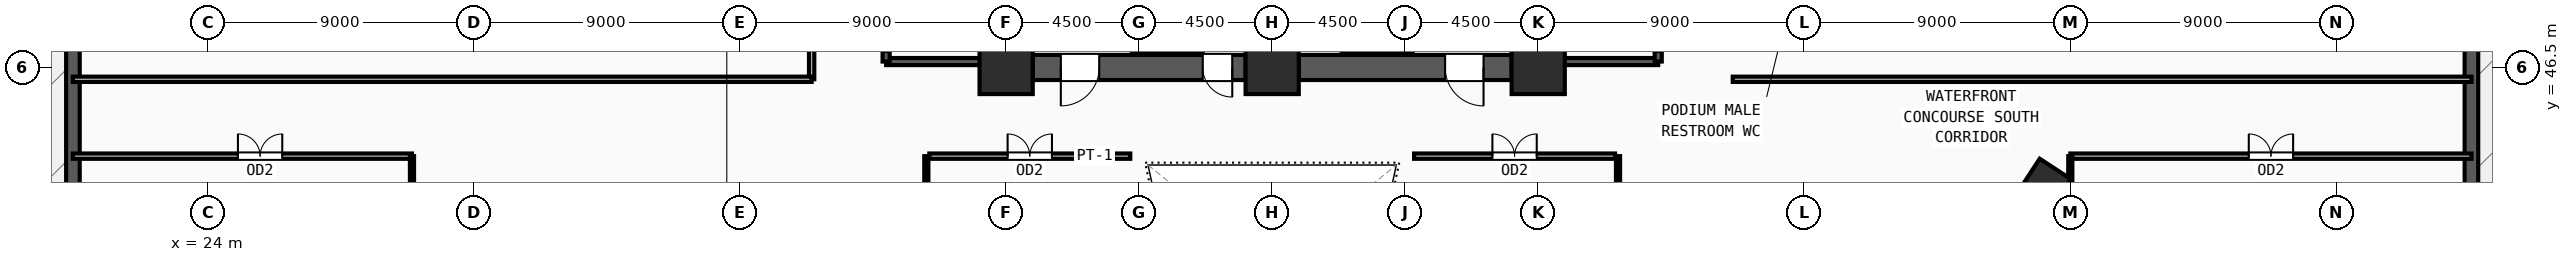
"""IFC4 building model, lengths in metres.
Left out: names, types, materials, properties, quantities, classifications, styles, units other than length and angle.
Written with IfcOpenShell. Run it as: python <this file> out.ifc"""

import sys

from ifc_helpers import new_model, si_unit, direction, frame, frame_2d, origin, origin_2d, place, context, subcontext, project, spatial, rectangle, extrude, source, transform, mapped, element, fill, save


model = new_model("IFC4")
c1 = context("Model", 3, precision=1e-05, world=origin(), true_north=direction((0.0, 1.0)))
c2 = subcontext(c1, "Body", "Model", "MODEL_VIEW")
j1 = project(units=[si_unit("LENGTHUNIT", "METRE"), si_unit("PLANEANGLEUNIT", "RADIAN")], contexts=[c1])
p1 = place(None, origin())
s1 = spatial("IfcSite", under=j1, at=p1, CompositionType="ELEMENT")
p2 = place(p1, origin())
s2 = spatial("IfcBuilding", under=s1, at=p2, CompositionType="ELEMENT")
p3 = place(p2, frame((0.0, 0.0, 9.9)))
s3 = spatial("IfcBuildingStorey", under=s2, at=p3, CompositionType="ELEMENT", Elevation=9.9)
m1 = source(origin(), c2, "Body", "SweptSolid", [
    extrude(rectangle(XDim=1.8, YDim=1.8, at=origin_2d()), origin(), (0.0, 0.0, 1.0), 4.5),
])
for number, where, z_axis, x_axis in (
    (1, (51.0, 46.5, 0.0), (0.0, 0.0, 1.0), (1.0, 0.0, 0.0)),
    (2, (60.0, 46.5, 0.0), (0.0, 0.0, 1.0), (1.0, 0.0, 0.0)),
    (3, (69.0, 46.5, 0.0), (0.0, 0.0, 1.0), (1.0, 0.0, 0.0)),
):
    element("IfcColumn", number, at=place(p3, frame(where, z_axis=z_axis, x_axis=x_axis)), inside=s3, PredefinedType="COLUMN", context=c2, shape_type="MappedRepresentation", body=[
        mapped(m1, transform((0.0, 0.0, 0.0), x_axis=(1.0, 0.0, 0.0), y_axis=(0.0, 1.0, 0.0), z_axis=(0.0, 0.0, 1.0), scale=1.0)),
    ])
m2 = source(origin(), c2, "Body", "SweptSolid", [
    extrude(rectangle(XDim=1.55, YDim=1.25, at=origin_2d()), origin(), (0.0, 0.0, 1.0), 4.5),
])
p4 = place(p3, frame((86.064, 42.423, 0.0), z_axis=(0.0, 0.0, 1.0), x_axis=(0.546978918409, 0.837146380758, 0.0)))
e4 = element("IfcColumn", 4, at=p4, inside=s3, PredefinedType="COLUMN", context=c2, shape_type="MappedRepresentation", body=[
    mapped(m2, transform((0.0, 0.0, 0.0), x_axis=(1.0, 0.0, 0.0), y_axis=(0.0, 1.0, 0.0), z_axis=(0.0, 0.0, 1.0), scale=1.0)),
])
p5 = place(p3, frame((100.57, 20.54, 0.0), z_axis=(0.0, 0.0, 1.0), x_axis=(0.0, 1.0, 0.0)))
e5 = element("IfcWall", 5, at=p5, inside=s3, PredefinedType="SOLIDWALL", context=c2, shape_type="SweptSolid", body=[
    extrude(rectangle(XDim=66.23, YDim=0.46, at=frame_2d((33.115, 0.0))), origin(), (0.0, 0.0, 1.0), 4.25),
])
m3 = source(origin(), c2, "Body", "SweptSolid", [
    extrude(rectangle(XDim=2.7, YDim=2.35, at=frame_2d((1.35, 1.175))), frame((0.0, 0.24, 0.0), z_axis=(0.0, -1.0, 0.0), x_axis=(1.0, 0.0, 0.0)), (0.0, 0.0, 1.0), 0.48),
])
p6 = place(p5, frame((8.111, 0.0, 0.55)))
e6 = element("IfcOpeningElement", 6, at=p6, cuts=e5, PredefinedType="OPENING", context=c2, shape_type="MappedRepresentation", body=[
    mapped(m3, transform((0.0, 0.0, 0.0), x_axis=(1.0, 0.0, 0.0), y_axis=(0.0, 1.0, 0.0), z_axis=(0.0, 0.0, 1.0), scale=1.0)),
])
p7 = place(p5, frame((17.573, 0.0, 0.55)))
e7 = element("IfcOpeningElement", 7, at=p7, cuts=e5, PredefinedType="OPENING", context=c2, shape_type="MappedRepresentation", body=[
    mapped(m3, transform((0.0, 0.0, 0.0), x_axis=(1.0, 0.0, 0.0), y_axis=(0.0, 1.0, 0.0), z_axis=(0.0, 0.0, 1.0), scale=1.0)),
])
p8 = place(p5, frame((27.034, 0.0, 0.55)))
e8 = element("IfcOpeningElement", 8, at=p8, cuts=e5, PredefinedType="OPENING", context=c2, shape_type="MappedRepresentation", body=[
    mapped(m3, transform((0.0, 0.0, 0.0), x_axis=(1.0, 0.0, 0.0), y_axis=(0.0, 1.0, 0.0), z_axis=(0.0, 0.0, 1.0), scale=1.0)),
])
p9 = place(p5, frame((36.496, 0.0, 0.55)))
e9 = element("IfcOpeningElement", 9, at=p9, cuts=e5, PredefinedType="OPENING", context=c2, shape_type="MappedRepresentation", body=[
    mapped(m3, transform((0.0, 0.0, 0.0), x_axis=(1.0, 0.0, 0.0), y_axis=(0.0, 1.0, 0.0), z_axis=(0.0, 0.0, 1.0), scale=1.0)),
])
p10 = place(p5, frame((55.419, 0.0, 0.55)))
e10 = element("IfcOpeningElement", 10, at=p10, cuts=e5, PredefinedType="OPENING", context=c2, shape_type="MappedRepresentation", body=[
    mapped(m3, transform((0.0, 0.0, 0.0), x_axis=(1.0, 0.0, 0.0), y_axis=(0.0, 1.0, 0.0), z_axis=(0.0, 0.0, 1.0), scale=1.0)),
])
p11 = place(p3, frame((19.43, 86.77, 0.0), z_axis=(0.0, 0.0, 1.0), x_axis=(0.0, -1.0, 0.0)))
e11 = element("IfcWall", 11, at=p11, inside=s3, PredefinedType="SOLIDWALL", context=c2, shape_type="SweptSolid", body=[
    extrude(rectangle(XDim=66.23, YDim=0.46, at=frame_2d((33.115, 0.0))), origin(), (0.0, 0.0, 1.0), 4.25),
])
p12 = place(p11, frame((8.111, 0.0, 0.55)))
e12 = element("IfcOpeningElement", 12, at=p12, cuts=e11, PredefinedType="OPENING", context=c2, shape_type="MappedRepresentation", body=[
    mapped(m3, transform((0.0, 0.0, 0.0), x_axis=(1.0, 0.0, 0.0), y_axis=(0.0, 1.0, 0.0), z_axis=(0.0, 0.0, 1.0), scale=1.0)),
])
p13 = place(p11, frame((27.034, 0.0, 0.55)))
e13 = element("IfcOpeningElement", 13, at=p13, cuts=e11, PredefinedType="OPENING", context=c2, shape_type="MappedRepresentation", body=[
    mapped(m3, transform((0.0, 0.0, 0.0), x_axis=(1.0, 0.0, 0.0), y_axis=(0.0, 1.0, 0.0), z_axis=(0.0, 0.0, 1.0), scale=1.0)),
])
p14 = place(p11, frame((36.496, 0.0, 0.55)))
e14 = element("IfcOpeningElement", 14, at=p14, cuts=e11, PredefinedType="OPENING", context=c2, shape_type="MappedRepresentation", body=[
    mapped(m3, transform((0.0, 0.0, 0.0), x_axis=(1.0, 0.0, 0.0), y_axis=(0.0, 1.0, 0.0), z_axis=(0.0, 0.0, 1.0), scale=1.0)),
])
p15 = place(p11, frame((45.957, 0.0, 0.55)))
e15 = element("IfcOpeningElement", 15, at=p15, cuts=e11, PredefinedType="OPENING", context=c2, shape_type="MappedRepresentation", body=[
    mapped(m3, transform((0.0, 0.0, 0.0), x_axis=(1.0, 0.0, 0.0), y_axis=(0.0, 1.0, 0.0), z_axis=(0.0, 0.0, 1.0), scale=1.0)),
])
p16 = place(p11, frame((55.419, 0.0, 0.55)))
e16 = element("IfcOpeningElement", 16, at=p16, cuts=e11, PredefinedType="OPENING", context=c2, shape_type="MappedRepresentation", body=[
    mapped(m3, transform((0.0, 0.0, 0.0), x_axis=(1.0, 0.0, 0.0), y_axis=(0.0, 1.0, 0.0), z_axis=(0.0, 0.0, 1.0), scale=1.0)),
])
p17 = place(p3, frame((68.1, 46.5, 0.0), z_axis=(0.0, 0.0, 1.0), x_axis=(-1.0, 0.0, 0.0)))
e17 = element("IfcWall", 17, at=p17, inside=s3, PredefinedType="SHEAR", context=c2, shape_type="SweptSolid", body=[
    extrude(rectangle(XDim=7.2, YDim=0.85, at=frame_2d((3.6, 0.0))), origin(), (0.0, 0.0, 1.0), 4.25),
])
m4 = source(origin(), c2, "Body", "SweptSolid", [
    extrude(rectangle(XDim=1.3, YDim=2.2, at=frame_2d((0.65, 1.1))), frame((0.0, 0.435, 0.0), z_axis=(0.0, -1.0, 0.0), x_axis=(1.0, 0.0, 0.0)), (0.0, 0.0, 1.0), 0.87),
])
p18 = place(p17, frame((0.95, 0.0, 0.0)))
e18 = element("IfcOpeningElement", 18, at=p18, cuts=e17, PredefinedType="OPENING", context=c2, shape_type="MappedRepresentation", body=[
    mapped(m4, transform((0.0, 0.0, 0.0), x_axis=(1.0, 0.0, 0.0), y_axis=(0.0, 1.0, 0.0), z_axis=(0.0, 0.0, 1.0), scale=1.0)),
])
p19 = place(p3, frame((59.1, 46.5, 0.0), z_axis=(0.0, 0.0, 1.0), x_axis=(-1.0, 0.0, 0.0)))
e19 = element("IfcWall", 19, at=p19, inside=s3, PredefinedType="SHEAR", context=c2, shape_type="SweptSolid", body=[
    extrude(rectangle(XDim=7.2, YDim=0.85, at=frame_2d((3.6, 0.0))), origin(), (0.0, 0.0, 1.0), 4.25),
])
p20 = place(p19, frame((4.95, 0.0, 0.0)))
e20 = element("IfcOpeningElement", 20, at=p20, cuts=e19, PredefinedType="OPENING", context=c2, shape_type="MappedRepresentation", body=[
    mapped(m4, transform((0.0, 0.0, 0.0), x_axis=(1.0, 0.0, 0.0), y_axis=(0.0, 1.0, 0.0), z_axis=(0.0, 0.0, 1.0), scale=1.0)),
])
m5 = source(origin(), c2, "Body", "SweptSolid", [
    extrude(rectangle(XDim=1.0, YDim=2.2, at=frame_2d((0.5, 1.1))), frame((0.0, 0.435, 0.0), z_axis=(0.0, -1.0, 0.0), x_axis=(1.0, 0.0, 0.0)), (0.0, 0.0, 1.0), 0.87),
])
p21 = place(p19, frame((0.45, 0.0, 0.0)))
e21 = element("IfcOpeningElement", 21, at=p21, cuts=e19, PredefinedType="OPENING", context=c2, shape_type="MappedRepresentation", body=[
    mapped(m5, transform((0.0, 0.0, 0.0), x_axis=(1.0, 0.0, 0.0), y_axis=(0.0, 1.0, 0.0), z_axis=(0.0, 0.0, 1.0), scale=1.0)),
])
p22 = place(p3, frame((46.94, 46.7, 0.0), z_axis=(0.0, 0.0, 1.0), x_axis=(1.0, 0.0, 0.0)))
e22 = element("IfcWall", 22, at=p22, inside=s3, PredefinedType="SOLIDWALL", context=c2, shape_type="SweptSolid", body=[
    extrude(rectangle(XDim=3.44, YDim=0.24, at=frame_2d((1.72, 0.0))), origin(), (0.0, 0.0, 1.0), 4.25),
])
p23 = place(p3, frame((50.38, 46.7, 0.0), z_axis=(0.0, 0.0, 1.0), x_axis=(0.0, 1.0, 0.0)))
e23 = element("IfcWall", 23, at=p23, inside=s3, PredefinedType="SOLIDWALL", context=c2, shape_type="SweptSolid", body=[
    extrude(rectangle(XDim=7.82, YDim=0.24, at=frame_2d((3.91, 0.0))), origin(), (0.0, 0.0, 1.0), 4.25),
])
p24 = place(p3, frame((46.94, 54.52, 0.0), z_axis=(0.0, 0.0, 1.0), x_axis=(0.0, -1.0, 0.0)))
e24 = element("IfcWall", 24, at=p24, inside=s3, PredefinedType="SOLIDWALL", context=c2, shape_type="SweptSolid", body=[
    extrude(rectangle(XDim=7.82, YDim=0.24, at=frame_2d((3.91, 0.0))), origin(), (0.0, 0.0, 1.0), 4.25),
])
m6 = source(origin(), c2, "Body", "SweptSolid", [
    extrude(rectangle(XDim=1.2, YDim=2.2, at=frame_2d((0.6, 1.1))), frame((0.0, 0.13, 0.0), z_axis=(0.0, -1.0, 0.0), x_axis=(1.0, 0.0, 0.0)), (0.0, 0.0, 1.0), 0.26),
])
p25 = place(p24, frame((6.3, 0.0, 0.0)))
e25 = element("IfcOpeningElement", 25, at=p25, cuts=e24, PredefinedType="OPENING", context=c2, shape_type="MappedRepresentation", body=[
    mapped(m6, transform((0.0, 0.0, 0.0), x_axis=(1.0, 0.0, 0.0), y_axis=(0.0, 1.0, 0.0), z_axis=(0.0, 0.0, 1.0), scale=1.0)),
])
p26 = place(p3, frame((69.62, 46.7, 0.0), z_axis=(0.0, 0.0, 1.0), x_axis=(1.0, 0.0, 0.0)))
e26 = element("IfcWall", 26, at=p26, inside=s3, PredefinedType="SOLIDWALL", context=c2, shape_type="SweptSolid", body=[
    extrude(rectangle(XDim=3.44, YDim=0.24, at=frame_2d((1.72, 0.0))), origin(), (0.0, 0.0, 1.0), 4.25),
])
p27 = place(p3, frame((73.06, 46.7, 0.0), z_axis=(0.0, 0.0, 1.0), x_axis=(0.0, 1.0, 0.0)))
e27 = element("IfcWall", 27, at=p27, inside=s3, PredefinedType="SOLIDWALL", context=c2, shape_type="SweptSolid", body=[
    extrude(rectangle(XDim=7.82, YDim=0.24, at=frame_2d((3.91, 0.0))), origin(), (0.0, 0.0, 1.0), 4.25),
])
p28 = place(p27, frame((0.32, 0.0, 0.0)))
e28 = element("IfcOpeningElement", 28, at=p28, cuts=e27, PredefinedType="OPENING", context=c2, shape_type="MappedRepresentation", body=[
    mapped(m6, transform((0.0, 0.0, 0.0), x_axis=(1.0, 0.0, 0.0), y_axis=(0.0, 1.0, 0.0), z_axis=(0.0, 0.0, 1.0), scale=1.0)),
])
p29 = place(p3, frame((69.62, 54.52, 0.0), z_axis=(0.0, 0.0, 1.0), x_axis=(0.0, -1.0, 0.0)))
e29 = element("IfcWall", 29, at=p29, inside=s3, PredefinedType="SOLIDWALL", context=c2, shape_type="SweptSolid", body=[
    extrude(rectangle(XDim=7.82, YDim=0.24, at=frame_2d((3.91, 0.0))), origin(), (0.0, 0.0, 1.0), 4.25),
])
p30 = place(p3, frame((48.4, 43.5, 0.0), z_axis=(0.0, 0.0, 1.0), x_axis=(1.0, 0.0, 0.0)))
e30 = element("IfcWall", 30, at=p30, inside=s3, PredefinedType="PARTITIONING", context=c2, shape_type="SweptSolid", body=[
    extrude(rectangle(XDim=6.8, YDim=0.18, at=frame_2d((3.4, 0.0))), origin(), (0.0, 0.0, 1.0), 4.25),
])
m7 = source(origin(), c2, "Body", "SweptSolid", [
    extrude(rectangle(XDim=1.5, YDim=2.2, at=frame_2d((0.75, 1.1))), frame((0.0, 0.1, 0.0), z_axis=(0.0, -1.0, 0.0), x_axis=(1.0, 0.0, 0.0)), (0.0, 0.0, 1.0), 0.2),
])
p31 = place(p30, frame((2.65, 0.0, 0.0)))
e31 = element("IfcOpeningElement", 31, at=p31, cuts=e30, PredefinedType="OPENING", context=c2, shape_type="MappedRepresentation", body=[
    mapped(m7, transform((0.0, 0.0, 0.0), x_axis=(1.0, 0.0, 0.0), y_axis=(0.0, 1.0, 0.0), z_axis=(0.0, 0.0, 1.0), scale=1.0)),
])
p32 = place(p3, frame((64.8, 43.5, 0.0), z_axis=(0.0, 0.0, 1.0), x_axis=(1.0, 0.0, 0.0)))
e32 = element("IfcWall", 32, at=p32, inside=s3, PredefinedType="PARTITIONING", context=c2, shape_type="SweptSolid", body=[
    extrude(rectangle(XDim=6.8, YDim=0.18, at=frame_2d((3.4, 0.0))), origin(), (0.0, 0.0, 1.0), 4.25),
])
p33 = place(p32, frame((2.65, 0.0, 0.0)))
e33 = element("IfcOpeningElement", 33, at=p33, cuts=e32, PredefinedType="OPENING", context=c2, shape_type="MappedRepresentation", body=[
    mapped(m7, transform((0.0, 0.0, 0.0), x_axis=(1.0, 0.0, 0.0), y_axis=(0.0, 1.0, 0.0), z_axis=(0.0, 0.0, 1.0), scale=1.0)),
])
p34 = place(p3, frame((19.425, 43.5, 0.0), z_axis=(0.0, 0.0, 1.0), x_axis=(1.0, 0.0, 0.0)))
e34 = element("IfcWall", 34, at=p34, inside=s3, PredefinedType="PARTITIONING", context=c2, shape_type="SweptSolid", body=[
    extrude(rectangle(XDim=11.475, YDim=0.18, at=frame_2d((5.737, 0.0))), origin(), (0.0, 0.0, 1.0), 4.25),
])
p35 = place(p34, frame((5.587, 0.0, 0.0)))
e35 = element("IfcOpeningElement", 35, at=p35, cuts=e34, PredefinedType="OPENING", context=c2, shape_type="MappedRepresentation", body=[
    mapped(m7, transform((0.0, 0.0, 0.0), x_axis=(1.0, 0.0, 0.0), y_axis=(0.0, 1.0, 0.0), z_axis=(0.0, 0.0, 1.0), scale=1.0)),
])
p36 = place(p3, frame((87.0, 43.5, 0.0), z_axis=(0.0, 0.0, 1.0), x_axis=(1.0, 0.0, 0.0)))
e36 = element("IfcWall", 36, at=p36, inside=s3, PredefinedType="PARTITIONING", context=c2, shape_type="SweptSolid", body=[
    extrude(rectangle(XDim=13.575, YDim=0.18, at=frame_2d((6.788, 0.0))), origin(), (0.0, 0.0, 1.0), 4.25),
])
p37 = place(p36, frame((6.038, 0.0, 0.0)))
e37 = element("IfcOpeningElement", 37, at=p37, cuts=e36, PredefinedType="OPENING", context=c2, shape_type="MappedRepresentation", body=[
    mapped(m7, transform((0.0, 0.0, 0.0), x_axis=(1.0, 0.0, 0.0), y_axis=(0.0, 1.0, 0.0), z_axis=(0.0, 0.0, 1.0), scale=1.0)),
])
p38 = place(p3, frame((44.42, 46.1, 0.0), z_axis=(0.0, 0.0, 1.0), x_axis=(0.0, 1.0, 0.0)))
e38 = element("IfcWall", 38, at=p38, inside=s3, PredefinedType="PARTITIONING", context=c2, shape_type="SweptSolid", body=[
    extrude(rectangle(XDim=22.0, YDim=0.18, at=frame_2d((11.0, 0.0))), origin(), (0.0, 0.0, 1.0), 4.25),
])
p39 = place(p38, frame((10.25, 0.0, 0.0)))
e39 = element("IfcOpeningElement", 39, at=p39, cuts=e38, PredefinedType="OPENING", context=c2, shape_type="MappedRepresentation", body=[
    mapped(m7, transform((0.0, 0.0, 0.0), x_axis=(1.0, 0.0, 0.0), y_axis=(0.0, 1.0, 0.0), z_axis=(0.0, 0.0, 1.0), scale=1.0)),
])
for number, where, z_axis, x_axis in (
    (40, (19.425, 46.1, 0.0), (0.0, 0.0, 1.0), (1.0, 0.0, 0.0)),
    (41, (75.58, 46.1, 0.0), (0.0, 0.0, 1.0), (1.0, 0.0, 0.0)),
):
    element("IfcWall", number, at=place(p3, frame(where, z_axis=z_axis, x_axis=x_axis)), inside=s3, PredefinedType="PARTITIONING", context=c2, shape_type="SweptSolid", body=[
        extrude(rectangle(XDim=24.995, YDim=0.18, at=frame_2d((12.498, 0.0))), origin(), (0.0, 0.0, 1.0), 4.25),
    ])
for number, where, z_axis, x_axis in (
    (42, (30.9, 19.425, 0.0), (0.0, 0.0, 1.0), (0.0, 1.0, 0.0)),
    (43, (87.0, 19.425, 0.0), (0.0, 0.0, 1.0), (0.0, 1.0, 0.0)),
    (44, (48.3, 19.425, 0.0), (0.0, 0.0, 1.0), (0.0, 1.0, 0.0)),
    (45, (71.7, 19.425, 0.0), (0.0, 0.0, 1.0), (0.0, 1.0, 0.0)),
):
    element("IfcWall", number, at=place(p3, frame(where, z_axis=z_axis, x_axis=x_axis)), inside=s3, PredefinedType="PARTITIONING", context=c2, shape_type="SweptSolid", body=[
        extrude(rectangle(XDim=24.075, YDim=0.14, at=frame_2d((12.038, 0.0))), origin(), (0.0, 0.0, 1.0), 4.25),
    ])
m8 = source(origin(), c2, "Body", "SweptSolid", [
    extrude(rectangle(XDim=1.3, YDim=2.2, at=frame_2d((0.65, 1.1))), frame((0.0, 0.025, 0.0), z_axis=(0.0, -1.0, 0.0), x_axis=(1.0, 0.0, 0.0)), (0.0, 0.0, 1.0), 0.05),
])
p40 = place(p20, origin())
e46 = element("IfcDoor", 46, at=p40, inside=s3, OperationType="SINGLE_SWING_RIGHT", PredefinedType="DOOR", context=c2, shape_type="MappedRepresentation", body=[
    mapped(m8, transform((0.0, 0.0, 0.0), x_axis=(1.0, 0.0, 0.0), y_axis=(0.0, 1.0, 0.0), z_axis=(0.0, 0.0, 1.0), scale=1.0)),
])
fill(e20, e46)
m9 = source(origin(), c2, "Body", "SweptSolid", [
    extrude(rectangle(XDim=1.0, YDim=2.2, at=frame_2d((0.5, 1.1))), frame((0.0, 0.025, 0.0), z_axis=(0.0, -1.0, 0.0), x_axis=(1.0, 0.0, 0.0)), (0.0, 0.0, 1.0), 0.05),
])
p41 = place(p21, origin())
e47 = element("IfcDoor", 47, at=p41, inside=s3, OperationType="SINGLE_SWING_LEFT", PredefinedType="DOOR", context=c2, shape_type="MappedRepresentation", body=[
    mapped(m9, transform((0.0, 0.0, 0.0), x_axis=(1.0, 0.0, 0.0), y_axis=(0.0, 1.0, 0.0), z_axis=(0.0, 0.0, 1.0), scale=1.0)),
])
fill(e21, e47)
p42 = place(p18, origin())
e48 = element("IfcDoor", 48, at=p42, inside=s3, OperationType="SINGLE_SWING_LEFT", PredefinedType="DOOR", context=c2, shape_type="MappedRepresentation", body=[
    mapped(m8, transform((0.0, 0.0, 0.0), x_axis=(1.0, 0.0, 0.0), y_axis=(0.0, 1.0, 0.0), z_axis=(0.0, 0.0, 1.0), scale=1.0)),
])
fill(e18, e48)
m10 = source(origin(), c2, "Body", "SweptSolid", [
    extrude(rectangle(XDim=1.5, YDim=2.2, at=frame_2d((0.75, 1.1))), frame((0.0, 0.025, 0.0), z_axis=(0.0, -1.0, 0.0), x_axis=(1.0, 0.0, 0.0)), (0.0, 0.0, 1.0), 0.05),
])
p43 = place(p31, origin())
e49 = element("IfcDoor", 49, at=p43, inside=s3, OperationType="DOUBLE_DOOR_SINGLE_SWING", PredefinedType="DOOR", context=c2, shape_type="MappedRepresentation", body=[
    mapped(m10, transform((0.0, 0.0, 0.0), x_axis=(1.0, 0.0, 0.0), y_axis=(0.0, 1.0, 0.0), z_axis=(0.0, 0.0, 1.0), scale=1.0)),
])
fill(e31, e49)
p44 = place(p33, origin())
e50 = element("IfcDoor", 50, at=p44, inside=s3, OperationType="DOUBLE_DOOR_SINGLE_SWING", PredefinedType="DOOR", context=c2, shape_type="MappedRepresentation", body=[
    mapped(m10, transform((0.0, 0.0, 0.0), x_axis=(1.0, 0.0, 0.0), y_axis=(0.0, 1.0, 0.0), z_axis=(0.0, 0.0, 1.0), scale=1.0)),
])
fill(e33, e50)
p45 = place(p35, origin())
e51 = element("IfcDoor", 51, at=p45, inside=s3, OperationType="DOUBLE_DOOR_SINGLE_SWING", PredefinedType="DOOR", context=c2, shape_type="MappedRepresentation", body=[
    mapped(m10, transform((0.0, 0.0, 0.0), x_axis=(1.0, 0.0, 0.0), y_axis=(0.0, 1.0, 0.0), z_axis=(0.0, 0.0, 1.0), scale=1.0)),
])
fill(e35, e51)
p46 = place(p37, origin())
e52 = element("IfcDoor", 52, at=p46, inside=s3, OperationType="DOUBLE_DOOR_SINGLE_SWING", PredefinedType="DOOR", context=c2, shape_type="MappedRepresentation", body=[
    mapped(m10, transform((0.0, 0.0, 0.0), x_axis=(1.0, 0.0, 0.0), y_axis=(0.0, 1.0, 0.0), z_axis=(0.0, 0.0, 1.0), scale=1.0)),
])
fill(e37, e52)
save(model, sys.argv[1])
